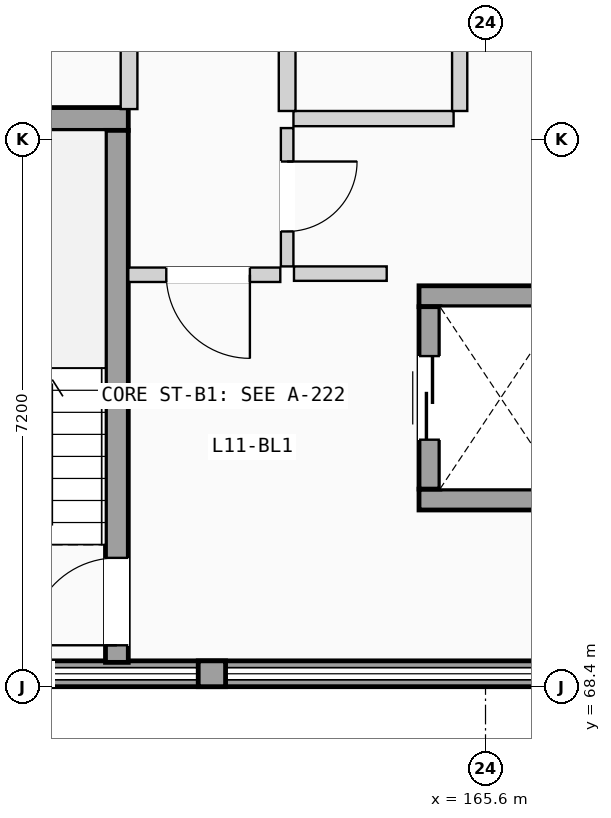
"""IFC4 building model, lengths in metres.
Left out: names, types, materials, properties, quantities, classifications, styles, units other than length and angle.
Written with IfcOpenShell. Run it as: python <this file> out.ifc"""

import sys

from ifc_helpers import new_model, si_unit, direction, frame, frame_2d, origin, place, context, subcontext, project, spatial, rectangle, extrude, element, fill, save


model = new_model("IFC4")
c1 = context("Model", 3, precision=1e-05, world=origin(), true_north=direction((0.0, 1.0)))
c2 = subcontext(c1, "Body", "Model", "MODEL_VIEW")
j1 = project(units=[si_unit("LENGTHUNIT", "METRE"), si_unit("PLANEANGLEUNIT", "RADIAN")], contexts=[c1])
p1 = place(None, origin())
s1 = spatial("IfcSite", under=j1, at=p1, CompositionType="ELEMENT")
p2 = place(p1, origin())
s2 = spatial("IfcBuilding", under=s1, at=p2, CompositionType="ELEMENT")
p3 = place(p2, frame((0.0, 0.0, 37.275)))
s3 = spatial("IfcBuildingStorey", under=s2, at=p3, CompositionType="ELEMENT", Elevation=37.275)
p4 = place(p3, frame((151.2, 68.57, 0.0), z_axis=(0.0, 0.0, 1.0), x_axis=(1.0, 0.0, 0.0)))
e1 = element("IfcWall", 1, at=p4, inside=s3, PredefinedType="SOLIDWALL", context=c2, shape_type="SweptSolid", body=[
    extrude(rectangle(XDim=21.6, YDim=0.34, at=frame_2d((10.8, 0.0))), origin(), (0.0, 0.0, 1.0), 1.11),
])
p5 = place(p3, frame((161.82, 68.57, 1.11), z_axis=(0.0, 0.0, 1.0), x_axis=(1.0, 0.0, 0.0)))
e2 = element("IfcWall", 2, at=p5, inside=s3, PredefinedType="SOLIDWALL", context=c2, shape_type="SweptSolid", body=[
    extrude(rectangle(XDim=0.36, YDim=0.34, at=frame_2d((0.18, 0.0))), origin(), (0.0, 0.0, 1.0), 1.49),
])
p6 = place(p3, frame((156.85, 75.87, 0.0), z_axis=(0.0, 0.0, 1.0), x_axis=(1.0, 0.0, 0.0)))
e3 = element("IfcWall", 3, at=p6, inside=s3, PredefinedType="SHEAR", context=c2, shape_type="SweptSolid", body=[
    extrude(rectangle(XDim=4.05, YDim=0.3, at=frame_2d((2.025, 0.0))), origin(), (0.0, 0.0, 1.0), 2.9),
])
p7 = place(p3, frame((160.75, 68.72, 0.0), z_axis=(0.0, 0.0, 1.0), x_axis=(0.0, 1.0, 0.0)))
e4 = element("IfcWall", 4, at=p7, inside=s3, PredefinedType="SHEAR", context=c2, shape_type="SweptSolid", body=[
    extrude(rectangle(XDim=7.0, YDim=0.3, at=frame_2d((3.5, 0.0))), origin(), (0.0, 0.0, 1.0), 2.9),
])
p8 = place(p7, frame((0.225, 0.0, 0.0)))
e5 = element("IfcOpeningElement", 5, at=p8, cuts=e4, PredefinedType="OPENING", context=c2, shape_type="SweptSolid", body=[
    extrude(rectangle(XDim=1.15, YDim=2.12, at=frame_2d((0.575, 1.06))), frame((0.0, 0.16, 0.0), z_axis=(0.0, -1.0, 0.0), x_axis=(1.0, 0.0, 0.0)), (0.0, 0.0, 1.0), 0.32),
])
for number, where, z_axis, x_axis in (
    (6, (164.725, 70.863, 0.0), (0.0, 0.0, 1.0), (1.0, 0.0, 0.0)),
    (7, (164.725, 73.538, 0.0), (0.0, 0.0, 1.0), (1.0, 0.0, 0.0)),
):
    element("IfcWall", number, at=place(p3, frame(where, z_axis=z_axis, x_axis=x_axis)), inside=s3, PredefinedType="SHEAR", context=c2, shape_type="SweptSolid", body=[
        extrude(rectangle(XDim=2.15, YDim=0.275, at=frame_2d((1.075, 0.0))), origin(), (0.0, 0.0, 1.0), 2.9),
    ])
p9 = place(p3, frame((164.863, 71.0, 0.0), z_axis=(0.0, 0.0, 1.0), x_axis=(0.0, 1.0, 0.0)))
e8 = element("IfcWall", 8, at=p9, inside=s3, PredefinedType="SHEAR", context=c2, shape_type="SweptSolid", body=[
    extrude(rectangle(XDim=2.4, YDim=0.275, at=frame_2d((1.2, 0.0))), origin(), (0.0, 0.0, 1.0), 2.9),
])
p10 = place(p9, frame((0.65, 0.0, 0.0)))
e9 = element("IfcOpeningElement", 9, at=p10, cuts=e8, PredefinedType="OPENING", context=c2, shape_type="SweptSolid", body=[
    extrude(rectangle(XDim=1.1, YDim=2.15, at=frame_2d((0.55, 1.075))), frame((0.0, 0.147, 0.0), z_axis=(0.0, -1.0, 0.0), x_axis=(1.0, 0.0, 0.0)), (0.0, 0.0, 1.0), 0.295),
])
p11 = place(p3, frame((163.08, 73.835, 0.0), z_axis=(0.0, 0.0, 1.0), x_axis=(1.0, 0.0, 0.0)))
e10 = element("IfcWall", 10, at=p11, inside=s3, PredefinedType="PARTITIONING", context=c2, shape_type="SweptSolid", body=[
    extrude(rectangle(XDim=1.22, YDim=0.19, at=frame_2d((0.61, 0.0))), origin(), (0.0, 0.0, 1.0), 2.87),
])
p12 = place(p3, frame((160.9, 73.82, 0.0), z_axis=(0.0, 0.0, 1.0), x_axis=(1.0, 0.0, 0.0)))
e11 = element("IfcWall", 11, at=p12, inside=s3, PredefinedType="PARTITIONING", context=c2, shape_type="SweptSolid", body=[
    extrude(rectangle(XDim=2.0, YDim=0.19, at=frame_2d((1.0, 0.0))), origin(), (0.0, 0.0, 1.0), 2.87),
])
p13 = place(p12, frame((0.5, 0.0, 0.0)))
e12 = element("IfcOpeningElement", 12, at=p13, cuts=e11, PredefinedType="OPENING", context=c2, shape_type="SweptSolid", body=[
    extrude(rectangle(XDim=1.1, YDim=2.12, at=frame_2d((0.55, 1.06))), frame((0.0, 0.105, 0.0), z_axis=(0.0, -1.0, 0.0), x_axis=(1.0, 0.0, 0.0)), (0.0, 0.0, 1.0), 0.21),
])
p14 = place(p3, frame((162.99, 73.93, 0.0), z_axis=(0.0, 0.0, 1.0), x_axis=(0.0, 1.0, 0.0)))
e13 = element("IfcWall", 13, at=p14, inside=s3, PredefinedType="PARTITIONING", context=c2, shape_type="SweptSolid", body=[
    extrude(rectangle(XDim=1.82, YDim=0.165, at=frame_2d((0.91, 0.0))), origin(), (0.0, 0.0, 1.0), 2.87),
])
p15 = place(p14, frame((0.46, 0.0, 0.0)))
e14 = element("IfcOpeningElement", 14, at=p15, cuts=e13, PredefinedType="OPENING", context=c2, shape_type="SweptSolid", body=[
    extrude(rectangle(XDim=0.92, YDim=2.04, at=frame_2d((0.46, 1.02))), frame((0.0, 0.093, 0.0), z_axis=(0.0, -1.0, 0.0), x_axis=(1.0, 0.0, 0.0)), (0.0, 0.0, 1.0), 0.185),
])
p16 = place(p3, frame((163.073, 75.875, 0.0), z_axis=(0.0, 0.0, 1.0), x_axis=(1.0, 0.0, 0.0)))
e15 = element("IfcWall", 15, at=p16, inside=s3, PredefinedType="PLUMBINGWALL", context=c2, shape_type="SweptSolid", body=[
    extrude(rectangle(XDim=2.107, YDim=0.2, at=frame_2d((1.053, 0.0))), origin(), (0.0, 0.0, 1.0), 2.87),
])
p17 = place(p3, frame((160.91, 76.0, 0.0), z_axis=(0.0, 0.0, 1.0), x_axis=(0.0, 1.0, 0.0)))
e16 = element("IfcWall", 16, at=p17, inside=s3, PredefinedType="PLUMBINGWALL", context=c2, shape_type="SweptSolid", body=[
    extrude(rectangle(XDim=5.785, YDim=0.22, at=frame_2d((2.893, 0.0))), origin(), (0.0, 0.0, 1.0), 2.87),
])
p18 = place(p3, frame((162.99, 75.975, 0.0), z_axis=(0.0, 0.0, 1.0), x_axis=(0.0, 1.0, 0.0)))
e17 = element("IfcWall", 17, at=p18, inside=s3, PredefinedType="PLUMBINGWALL", context=c2, shape_type="SweptSolid", body=[
    extrude(rectangle(XDim=5.81, YDim=0.22, at=frame_2d((2.905, 0.0))), origin(), (0.0, 0.0, 1.0), 2.87),
])
p19 = place(p3, frame((165.26, 75.975, 0.0), z_axis=(0.0, 0.0, 1.0), x_axis=(0.0, 1.0, 0.0)))
e18 = element("IfcWall", 18, at=p19, inside=s3, PredefinedType="PLUMBINGWALL", context=c2, shape_type="SweptSolid", body=[
    extrude(rectangle(XDim=5.83, YDim=0.2, at=frame_2d((2.915, 0.0))), origin(), (0.0, 0.0, 1.0), 2.87),
])
p20 = place(p19, frame((2.493, 0.0, 0.0)))
e19 = element("IfcOpeningElement", 19, at=p20, cuts=e18, PredefinedType="OPENING", context=c2, shape_type="SweptSolid", body=[
    extrude(rectangle(XDim=0.85, YDim=2.01, at=frame_2d((0.425, 1.005))), frame((0.0, 0.11, 0.0), z_axis=(0.0, -1.0, 0.0), x_axis=(1.0, 0.0, 0.0)), (0.0, 0.0, 1.0), 0.22),
])
p21 = place(p8, origin())
e20 = element("IfcDoor", 20, at=p21, inside=s3, OperationType="SINGLE_SWING_LEFT", PredefinedType="DOOR", context=c2, shape_type="SweptSolid", body=[
    extrude(rectangle(XDim=1.15, YDim=2.12, at=frame_2d((0.575, 1.06))), frame((0.0, 0.025, 0.0), z_axis=(0.0, -1.0, 0.0), x_axis=(1.0, 0.0, 0.0)), (0.0, 0.0, 1.0), 0.05),
])
fill(e5, e20)
p22 = place(p10, origin())
e21 = element("IfcDoor", 21, at=p22, inside=s3, OperationType="SLIDING_TO_LEFT", PredefinedType="DOOR", context=c2, shape_type="SweptSolid", body=[
    extrude(rectangle(XDim=1.1, YDim=2.15, at=frame_2d((0.55, 1.075))), frame((0.0, 0.025, 0.0), z_axis=(0.0, -1.0, 0.0), x_axis=(1.0, 0.0, 0.0)), (0.0, 0.0, 1.0), 0.05),
])
fill(e9, e21)
p23 = place(p13, frame((1.1, 0.0, 0.0), z_axis=(0.0, 0.0, 1.0), x_axis=(-1.0, 0.0, 0.0)))
e22 = element("IfcDoor", 22, at=p23, inside=s3, OperationType="SINGLE_SWING_RIGHT", PredefinedType="DOOR", context=c2, shape_type="SweptSolid", body=[
    extrude(rectangle(XDim=1.1, YDim=2.12, at=frame_2d((0.55, 1.06))), frame((0.0, 0.025, 0.0), z_axis=(0.0, -1.0, 0.0), x_axis=(1.0, 0.0, 0.0)), (0.0, 0.0, 1.0), 0.05),
])
fill(e12, e22)
p24 = place(p15, frame((0.92, 0.0, 0.0), z_axis=(0.0, 0.0, 1.0), x_axis=(-1.0, 0.0, 0.0)))
e23 = element("IfcDoor", 23, at=p24, inside=s3, OperationType="SINGLE_SWING_RIGHT", PredefinedType="DOOR", context=c2, shape_type="SweptSolid", body=[
    extrude(rectangle(XDim=0.92, YDim=2.04, at=frame_2d((0.46, 1.02))), frame((0.0, 0.025, 0.0), z_axis=(0.0, -1.0, 0.0), x_axis=(1.0, 0.0, 0.0)), (0.0, 0.0, 1.0), 0.05),
])
fill(e14, e23)
save(model, sys.argv[1])
